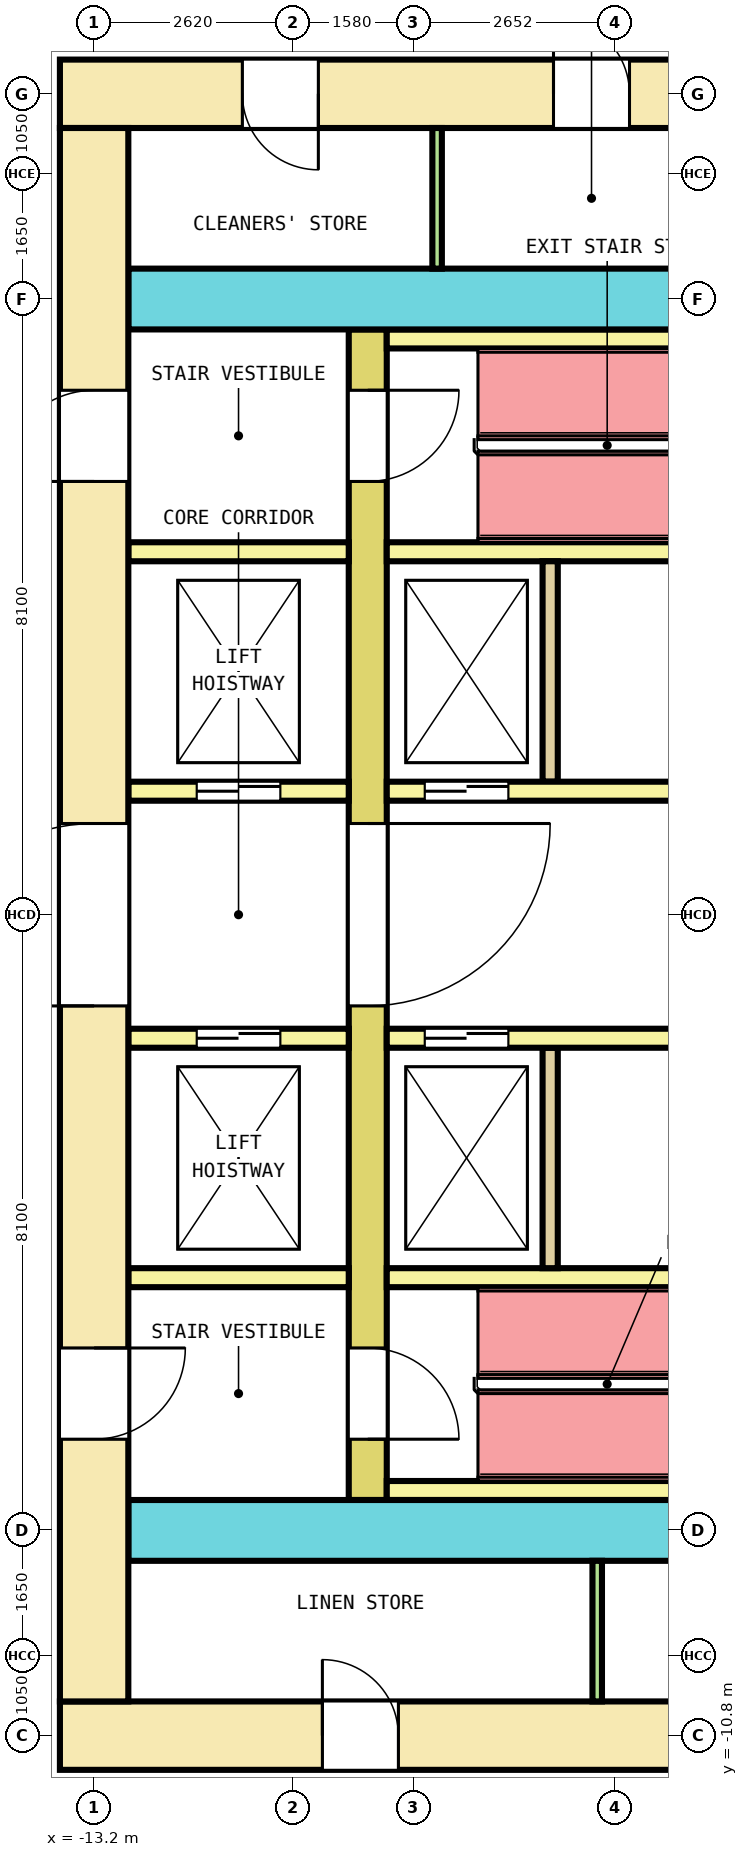
"""IFC4 building model, lengths in metres.
Left out: names, types, materials, properties, quantities, classifications, styles, units other than length and angle.
Written with IfcOpenShell. Run it as: python <this file> out.ifc"""

import sys

from ifc_helpers import new_model, si_unit, direction, frame, frame_2d, origin, place, context, subcontext, project, spatial, rectangle, extrude, element, fill, save


model = new_model("IFC4")
c1 = context("Model", 3, precision=1e-05, world=origin(), true_north=direction((0.0, 1.0)))
c2 = subcontext(c1, "Body", "Model", "MODEL_VIEW")
j1 = project(units=[si_unit("LENGTHUNIT", "METRE"), si_unit("PLANEANGLEUNIT", "RADIAN")], contexts=[c1])
p1 = place(None, origin())
s1 = spatial("IfcSite", under=j1, at=p1, CompositionType="ELEMENT")
p2 = place(p1, origin())
s2 = spatial("IfcBuilding", under=s1, at=p2, CompositionType="ELEMENT")
p3 = place(p2, frame((0.0, 0.0, 36.6)))
s3 = spatial("IfcBuildingStorey", under=s2, at=p3, CompositionType="ELEMENT", Elevation=36.6)
p4 = place(p3, frame((-13.65, 10.8, 0.0), z_axis=(0.0, 0.0, 1.0), x_axis=(1.0, 0.0, 0.0)))
e1 = element("IfcWall", 1, at=p4, inside=s3, PredefinedType="SHEAR", context=c2, shape_type="SweptSolid", body=[
    extrude(rectangle(XDim=27.3, YDim=0.9, at=frame_2d((13.65, 0.0))), origin(), (0.0, 0.0, 1.0), 4.1),
])
p5 = place(p4, frame((2.4, 0.0, 0.0)))
e2 = element("IfcOpeningElement", 2, at=p5, cuts=e1, PredefinedType="OPENING", context=c2, shape_type="SweptSolid", body=[
    extrude(rectangle(XDim=1.0, YDim=2.1, at=frame_2d((0.5, 1.05))), frame((0.0, 0.46, 0.0), z_axis=(0.0, -1.0, 0.0), x_axis=(1.0, 0.0, 0.0)), (0.0, 0.0, 1.0), 0.92),
])
p6 = place(p4, frame((6.494, 0.0, 0.0)))
e3 = element("IfcOpeningElement", 3, at=p6, cuts=e1, PredefinedType="OPENING", context=c2, shape_type="SweptSolid", body=[
    extrude(rectangle(XDim=1.0, YDim=2.1, at=frame_2d((0.5, 1.05))), frame((0.0, 0.46, 0.0), z_axis=(0.0, -1.0, 0.0), x_axis=(1.0, 0.0, 0.0)), (0.0, 0.0, 1.0), 0.92),
])
p7 = place(p4, frame((10.556, 0.0, 0.0)))
e4 = element("IfcOpeningElement", 4, at=p7, cuts=e1, PredefinedType="OPENING", context=c2, shape_type="SweptSolid", body=[
    extrude(rectangle(XDim=1.0, YDim=2.1, at=frame_2d((0.5, 1.05))), frame((0.0, 0.46, 0.0), z_axis=(0.0, -1.0, 0.0), x_axis=(1.0, 0.0, 0.0)), (0.0, 0.0, 1.0), 0.92),
])
p8 = place(p4, frame((18.859, 0.0, 0.0)))
e5 = element("IfcOpeningElement", 5, at=p8, cuts=e1, PredefinedType="OPENING", context=c2, shape_type="SweptSolid", body=[
    extrude(rectangle(XDim=1.0, YDim=2.1, at=frame_2d((0.5, 1.05))), frame((0.0, 0.46, 0.0), z_axis=(0.0, -1.0, 0.0), x_axis=(1.0, 0.0, 0.0)), (0.0, 0.0, 1.0), 0.92),
])
p9 = place(p4, frame((23.584, 0.0, 0.0)))
e6 = element("IfcOpeningElement", 6, at=p9, cuts=e1, PredefinedType="OPENING", context=c2, shape_type="SweptSolid", body=[
    extrude(rectangle(XDim=1.0, YDim=2.1, at=frame_2d((0.5, 1.05))), frame((0.0, 0.46, 0.0), z_axis=(0.0, -1.0, 0.0), x_axis=(1.0, 0.0, 0.0)), (0.0, 0.0, 1.0), 0.92),
])
p10 = place(p4, frame((14.575, 0.0, 0.0)))
e7 = element("IfcOpeningElement", 7, at=p10, cuts=e1, PredefinedType="OPENING", context=c2, shape_type="SweptSolid", body=[
    extrude(rectangle(XDim=1.4, YDim=2.1, at=frame_2d((0.7, 1.05))), frame((0.0, 0.46, 0.0), z_axis=(0.0, -1.0, 0.0), x_axis=(1.0, 0.0, 0.0)), (0.0, 0.0, 1.0), 0.92),
])
p11 = place(p3, frame((-13.65, -10.8, 0.0), z_axis=(0.0, 0.0, 1.0), x_axis=(1.0, 0.0, 0.0)))
e8 = element("IfcWall", 8, at=p11, inside=s3, PredefinedType="SHEAR", context=c2, shape_type="SweptSolid", body=[
    extrude(rectangle(XDim=27.3, YDim=0.9, at=frame_2d((13.65, 0.0))), origin(), (0.0, 0.0, 1.0), 4.1),
])
p12 = place(p11, frame((3.453, 0.0, 0.0)))
e9 = element("IfcOpeningElement", 9, at=p12, cuts=e8, PredefinedType="OPENING", context=c2, shape_type="SweptSolid", body=[
    extrude(rectangle(XDim=1.0, YDim=2.1, at=frame_2d((0.5, 1.05))), frame((0.0, 0.46, 0.0), z_axis=(0.0, -1.0, 0.0), x_axis=(1.0, 0.0, 0.0)), (0.0, 0.0, 1.0), 0.92),
])
p13 = place(p11, frame((9.653, 0.0, 0.0)))
e10 = element("IfcOpeningElement", 10, at=p13, cuts=e8, PredefinedType="OPENING", context=c2, shape_type="SweptSolid", body=[
    extrude(rectangle(XDim=1.0, YDim=2.1, at=frame_2d((0.5, 1.05))), frame((0.0, 0.46, 0.0), z_axis=(0.0, -1.0, 0.0), x_axis=(1.0, 0.0, 0.0)), (0.0, 0.0, 1.0), 0.92),
])
p14 = place(p11, frame((19.872, 0.0, 0.0)))
e11 = element("IfcOpeningElement", 11, at=p14, cuts=e8, PredefinedType="OPENING", context=c2, shape_type="SweptSolid", body=[
    extrude(rectangle(XDim=1.0, YDim=2.1, at=frame_2d((0.5, 1.05))), frame((0.0, 0.46, 0.0), z_axis=(0.0, -1.0, 0.0), x_axis=(1.0, 0.0, 0.0)), (0.0, 0.0, 1.0), 0.92),
])
p15 = place(p11, frame((23.922, 0.0, 0.0)))
e12 = element("IfcOpeningElement", 12, at=p15, cuts=e8, PredefinedType="OPENING", context=c2, shape_type="SweptSolid", body=[
    extrude(rectangle(XDim=1.0, YDim=2.1, at=frame_2d((0.5, 1.05))), frame((0.0, 0.46, 0.0), z_axis=(0.0, -1.0, 0.0), x_axis=(1.0, 0.0, 0.0)), (0.0, 0.0, 1.0), 0.92),
])
p16 = place(p11, frame((15.2, 0.0, 0.0)))
e13 = element("IfcOpeningElement", 13, at=p16, cuts=e8, PredefinedType="OPENING", context=c2, shape_type="SweptSolid", body=[
    extrude(rectangle(XDim=1.2, YDim=2.1, at=frame_2d((0.6, 1.05))), frame((0.0, 0.46, 0.0), z_axis=(0.0, -1.0, 0.0), x_axis=(1.0, 0.0, 0.0)), (0.0, 0.0, 1.0), 0.92),
])
p17 = place(p3, frame((-13.2, -10.35, 0.0), z_axis=(0.0, 0.0, 1.0), x_axis=(0.0, 1.0, 0.0)))
e14 = element("IfcWall", 14, at=p17, inside=s3, PredefinedType="SHEAR", context=c2, shape_type="SweptSolid", body=[
    extrude(rectangle(XDim=20.7, YDim=0.9, at=frame_2d((10.35, 0.0))), origin(), (0.0, 0.0, 1.0), 4.1),
])
p18 = place(p17, frame((9.15, 0.0, 0.0)))
e15 = element("IfcOpeningElement", 15, at=p18, cuts=e14, PredefinedType="OPENING", context=c2, shape_type="SweptSolid", body=[
    extrude(rectangle(XDim=2.4, YDim=2.1, at=frame_2d((1.2, 1.05))), frame((0.0, 0.46, 0.0), z_axis=(0.0, -1.0, 0.0), x_axis=(1.0, 0.0, 0.0)), (0.0, 0.0, 1.0), 0.92),
])
p19 = place(p17, frame((16.05, 0.0, 0.0)))
e16 = element("IfcOpeningElement", 16, at=p19, cuts=e14, PredefinedType="OPENING", context=c2, shape_type="SweptSolid", body=[
    extrude(rectangle(XDim=1.2, YDim=2.1, at=frame_2d((0.6, 1.05))), frame((0.0, 0.46, 0.0), z_axis=(0.0, -1.0, 0.0), x_axis=(1.0, 0.0, 0.0)), (0.0, 0.0, 1.0), 0.92),
])
p20 = place(p17, frame((3.45, 0.0, 0.0)))
e17 = element("IfcOpeningElement", 17, at=p20, cuts=e14, PredefinedType="OPENING", context=c2, shape_type="SweptSolid", body=[
    extrude(rectangle(XDim=1.2, YDim=2.1, at=frame_2d((0.6, 1.05))), frame((0.0, 0.46, 0.0), z_axis=(0.0, -1.0, 0.0), x_axis=(1.0, 0.0, 0.0)), (0.0, 0.0, 1.0), 0.92),
])
p21 = place(p3, frame((-12.75, 8.1, 0.0), z_axis=(0.0, 0.0, 1.0), x_axis=(1.0, 0.0, 0.0)))
e18 = element("IfcWall", 18, at=p21, inside=s3, PredefinedType="SHEAR", context=c2, shape_type="SweptSolid", body=[
    extrude(rectangle(XDim=25.5, YDim=0.8, at=frame_2d((12.75, 0.0))), origin(), (0.0, 0.0, 1.0), 4.1),
])
p22 = place(p21, frame((13.675, 0.0, 0.0)))
e19 = element("IfcOpeningElement", 19, at=p22, cuts=e18, PredefinedType="OPENING", context=c2, shape_type="SweptSolid", body=[
    extrude(rectangle(XDim=1.4, YDim=2.1, at=frame_2d((0.7, 1.05))), frame((0.0, 0.41, 0.0), z_axis=(0.0, -1.0, 0.0), x_axis=(1.0, 0.0, 0.0)), (0.0, 0.0, 1.0), 0.82),
])
p23 = place(p3, frame((-12.75, -8.1, 0.0), z_axis=(0.0, 0.0, 1.0), x_axis=(1.0, 0.0, 0.0)))
e20 = element("IfcWall", 20, at=p23, inside=s3, PredefinedType="SHEAR", context=c2, shape_type="SweptSolid", body=[
    extrude(rectangle(XDim=25.5, YDim=0.8, at=frame_2d((12.75, 0.0))), origin(), (0.0, 0.0, 1.0), 4.1),
])
p24 = place(p23, frame((14.3, 0.0, 0.0)))
e21 = element("IfcOpeningElement", 21, at=p24, cuts=e20, PredefinedType="OPENING", context=c2, shape_type="SweptSolid", body=[
    extrude(rectangle(XDim=1.2, YDim=2.1, at=frame_2d((0.6, 1.05))), frame((0.0, 0.41, 0.0), z_axis=(0.0, -1.0, 0.0), x_axis=(1.0, 0.0, 0.0)), (0.0, 0.0, 1.0), 0.82),
])
p25 = place(p3, frame((-9.6, -7.7, 0.0), z_axis=(0.0, 0.0, 1.0), x_axis=(0.0, 1.0, 0.0)))
e22 = element("IfcWall", 22, at=p25, inside=s3, PredefinedType="SHEAR", context=c2, shape_type="SweptSolid", body=[
    extrude(rectangle(XDim=15.4, YDim=0.5, at=frame_2d((7.7, 0.0))), origin(), (0.0, 0.0, 1.0), 4.1),
])
p26 = place(p25, frame((6.5, 0.0, 0.0)))
e23 = element("IfcOpeningElement", 23, at=p26, cuts=e22, PredefinedType="OPENING", context=c2, shape_type="SweptSolid", body=[
    extrude(rectangle(XDim=2.4, YDim=2.1, at=frame_2d((1.2, 1.05))), frame((0.0, 0.26, 0.0), z_axis=(0.0, -1.0, 0.0), x_axis=(1.0, 0.0, 0.0)), (0.0, 0.0, 1.0), 0.52),
])
p27 = place(p25, frame((13.4, 0.0, 0.0)))
e24 = element("IfcOpeningElement", 24, at=p27, cuts=e22, PredefinedType="OPENING", context=c2, shape_type="SweptSolid", body=[
    extrude(rectangle(XDim=1.2, YDim=2.1, at=frame_2d((0.6, 1.05))), frame((0.0, 0.26, 0.0), z_axis=(0.0, -1.0, 0.0), x_axis=(1.0, 0.0, 0.0)), (0.0, 0.0, 1.0), 0.52),
])
p28 = place(p25, frame((0.8, 0.0, 0.0)))
e25 = element("IfcOpeningElement", 25, at=p28, cuts=e22, PredefinedType="OPENING", context=c2, shape_type="SweptSolid", body=[
    extrude(rectangle(XDim=1.2, YDim=2.1, at=frame_2d((0.6, 1.05))), frame((0.0, 0.26, 0.0), z_axis=(0.0, -1.0, 0.0), x_axis=(1.0, 0.0, 0.0)), (0.0, 0.0, 1.0), 0.52),
])
p29 = place(p3, frame((-12.75, 1.625, 0.0), z_axis=(0.0, 0.0, 1.0), x_axis=(1.0, 0.0, 0.0)))
e26 = element("IfcWall", 26, at=p29, inside=s3, PredefinedType="SOLIDWALL", context=c2, shape_type="SweptSolid", body=[
    extrude(rectangle(XDim=2.9, YDim=0.25, at=frame_2d((1.45, 0.0))), origin(), (0.0, 0.0, 1.0), 4.1),
])
p30 = place(p29, frame((0.9, 0.0, 0.0)))
e27 = element("IfcOpeningElement", 27, at=p30, cuts=e26, PredefinedType="OPENING", context=c2, shape_type="SweptSolid", body=[
    extrude(rectangle(XDim=1.1, YDim=2.1, at=frame_2d((0.55, 1.05))), frame((0.0, 0.135, 0.0), z_axis=(0.0, -1.0, 0.0), x_axis=(1.0, 0.0, 0.0)), (0.0, 0.0, 1.0), 0.27),
])
p31 = place(p3, frame((-9.35, 1.625, 0.0), z_axis=(0.0, 0.0, 1.0), x_axis=(1.0, 0.0, 0.0)))
e28 = element("IfcWall", 28, at=p31, inside=s3, PredefinedType="SOLIDWALL", context=c2, shape_type="SweptSolid", body=[
    extrude(rectangle(XDim=18.7, YDim=0.25, at=frame_2d((9.35, 0.0))), origin(), (0.0, 0.0, 1.0), 4.1),
])
p32 = place(p31, frame((0.5, 0.0, 0.0)))
e29 = element("IfcOpeningElement", 29, at=p32, cuts=e28, PredefinedType="OPENING", context=c2, shape_type="SweptSolid", body=[
    extrude(rectangle(XDim=1.1, YDim=2.1, at=frame_2d((0.55, 1.05))), frame((0.0, 0.135, 0.0), z_axis=(0.0, -1.0, 0.0), x_axis=(1.0, 0.0, 0.0)), (0.0, 0.0, 1.0), 0.27),
])
p33 = place(p31, frame((17.1, 0.0, 0.0)))
e30 = element("IfcOpeningElement", 30, at=p33, cuts=e28, PredefinedType="OPENING", context=c2, shape_type="SweptSolid", body=[
    extrude(rectangle(XDim=1.1, YDim=2.1, at=frame_2d((0.55, 1.05))), frame((0.0, 0.135, 0.0), z_axis=(0.0, -1.0, 0.0), x_axis=(1.0, 0.0, 0.0)), (0.0, 0.0, 1.0), 0.27),
])
p34 = place(p3, frame((-12.75, 4.775, 0.0), z_axis=(0.0, 0.0, 1.0), x_axis=(1.0, 0.0, 0.0)))
e31 = element("IfcWall", 31, at=p34, inside=s3, PredefinedType="SOLIDWALL", context=c2, shape_type="SweptSolid", body=[
    extrude(rectangle(XDim=2.9, YDim=0.25, at=frame_2d((1.45, 0.0))), origin(), (0.0, 0.0, 1.0), 4.1),
])
p35 = place(p3, frame((-9.35, 4.775, 0.0), z_axis=(0.0, 0.0, 1.0), x_axis=(1.0, 0.0, 0.0)))
e32 = element("IfcWall", 32, at=p35, inside=s3, PredefinedType="SOLIDWALL", context=c2, shape_type="SweptSolid", body=[
    extrude(rectangle(XDim=18.7, YDim=0.25, at=frame_2d((9.35, 0.0))), origin(), (0.0, 0.0, 1.0), 4.1),
])
p36 = place(p3, frame((-7.2, 1.75, 0.0), z_axis=(0.0, 0.0, 1.0), x_axis=(0.0, 1.0, 0.0)))
e33 = element("IfcWall", 33, at=p36, inside=s3, PredefinedType="SOLIDWALL", context=c2, shape_type="SweptSolid", body=[
    extrude(rectangle(XDim=2.9, YDim=0.2, at=frame_2d((1.45, 0.0))), origin(), (0.0, 0.0, 1.0), 4.1),
])
p37 = place(p3, frame((-12.75, -1.625, 0.0), z_axis=(0.0, 0.0, 1.0), x_axis=(1.0, 0.0, 0.0)))
e34 = element("IfcWall", 34, at=p37, inside=s3, PredefinedType="SOLIDWALL", context=c2, shape_type="SweptSolid", body=[
    extrude(rectangle(XDim=2.9, YDim=0.25, at=frame_2d((1.45, 0.0))), origin(), (0.0, 0.0, 1.0), 4.1),
])
p38 = place(p37, frame((0.9, 0.0, 0.0)))
e35 = element("IfcOpeningElement", 35, at=p38, cuts=e34, PredefinedType="OPENING", context=c2, shape_type="SweptSolid", body=[
    extrude(rectangle(XDim=1.1, YDim=2.1, at=frame_2d((0.55, 1.05))), frame((0.0, 0.135, 0.0), z_axis=(0.0, -1.0, 0.0), x_axis=(1.0, 0.0, 0.0)), (0.0, 0.0, 1.0), 0.27),
])
p39 = place(p3, frame((-9.35, -1.625, 0.0), z_axis=(0.0, 0.0, 1.0), x_axis=(1.0, 0.0, 0.0)))
e36 = element("IfcWall", 36, at=p39, inside=s3, PredefinedType="SOLIDWALL", context=c2, shape_type="SweptSolid", body=[
    extrude(rectangle(XDim=18.7, YDim=0.25, at=frame_2d((9.35, 0.0))), origin(), (0.0, 0.0, 1.0), 4.1),
])
p40 = place(p39, frame((0.5, 0.0, 0.0)))
e37 = element("IfcOpeningElement", 37, at=p40, cuts=e36, PredefinedType="OPENING", context=c2, shape_type="SweptSolid", body=[
    extrude(rectangle(XDim=1.1, YDim=2.1, at=frame_2d((0.55, 1.05))), frame((0.0, 0.135, 0.0), z_axis=(0.0, -1.0, 0.0), x_axis=(1.0, 0.0, 0.0)), (0.0, 0.0, 1.0), 0.27),
])
p41 = place(p39, frame((17.1, 0.0, 0.0)))
e38 = element("IfcOpeningElement", 38, at=p41, cuts=e36, PredefinedType="OPENING", context=c2, shape_type="SweptSolid", body=[
    extrude(rectangle(XDim=1.1, YDim=2.1, at=frame_2d((0.55, 1.05))), frame((0.0, 0.135, 0.0), z_axis=(0.0, -1.0, 0.0), x_axis=(1.0, 0.0, 0.0)), (0.0, 0.0, 1.0), 0.27),
])
p42 = place(p3, frame((-12.75, -4.775, 0.0), z_axis=(0.0, 0.0, 1.0), x_axis=(1.0, 0.0, 0.0)))
e39 = element("IfcWall", 39, at=p42, inside=s3, PredefinedType="SOLIDWALL", context=c2, shape_type="SweptSolid", body=[
    extrude(rectangle(XDim=2.9, YDim=0.25, at=frame_2d((1.45, 0.0))), origin(), (0.0, 0.0, 1.0), 4.1),
])
p43 = place(p3, frame((-9.35, -4.775, 0.0), z_axis=(0.0, 0.0, 1.0), x_axis=(1.0, 0.0, 0.0)))
e40 = element("IfcWall", 40, at=p43, inside=s3, PredefinedType="SOLIDWALL", context=c2, shape_type="SweptSolid", body=[
    extrude(rectangle(XDim=18.7, YDim=0.25, at=frame_2d((9.35, 0.0))), origin(), (0.0, 0.0, 1.0), 4.1),
])
p44 = place(p3, frame((-7.2, -4.65, 0.0), z_axis=(0.0, 0.0, 1.0), x_axis=(0.0, 1.0, 0.0)))
e41 = element("IfcWall", 41, at=p44, inside=s3, PredefinedType="SOLIDWALL", context=c2, shape_type="SweptSolid", body=[
    extrude(rectangle(XDim=2.9, YDim=0.2, at=frame_2d((1.45, 0.0))), origin(), (0.0, 0.0, 1.0), 4.1),
])
for number, where, z_axis, x_axis in (
    (42, (-9.35, 7.575, 0.0), (0.0, 0.0, 1.0), (1.0, 0.0, 0.0)),
    (43, (-9.35, -7.575, 0.0), (0.0, 0.0, 1.0), (1.0, 0.0, 0.0)),
):
    element("IfcWall", number, at=place(p3, frame(where, z_axis=z_axis, x_axis=x_axis)), inside=s3, PredefinedType="SOLIDWALL", context=c2, shape_type="SweptSolid", body=[
        extrude(rectangle(XDim=5.8, YDim=0.25, at=frame_2d((2.9, 0.0))), origin(), (0.0, 0.0, 1.0), 4.1),
    ])
for number, where, z_axis, x_axis in (
    (44, (-8.688, 8.5, 0.0), (0.0, 0.0, 1.0), (0.0, 1.0, 0.0)),
    (45, (-6.581, -10.35, 0.0), (0.0, 0.0, 1.0), (0.0, 1.0, 0.0)),
):
    element("IfcWall", number, at=place(p3, frame(where, z_axis=z_axis, x_axis=x_axis)), inside=s3, PredefinedType="PARTITIONING", context=c2, shape_type="SweptSolid", body=[
        extrude(rectangle(XDim=1.85, YDim=0.125, at=frame_2d((0.925, 0.0))), origin(), (0.0, 0.0, 1.0), 4.1),
    ])
p45 = place(p30, origin())
e46 = element("IfcDoor", 46, at=p45, inside=s3, OperationType="DOUBLE_DOOR_SLIDING", PredefinedType="DOOR", context=c2, shape_type="SweptSolid", body=[
    extrude(rectangle(XDim=1.1, YDim=2.1, at=frame_2d((0.55, 1.05))), frame((0.0, 0.075, 0.0), z_axis=(0.0, -1.0, 0.0), x_axis=(1.0, 0.0, 0.0)), (0.0, 0.0, 1.0), 0.15),
])
fill(e27, e46)
p46 = place(p32, origin())
e47 = element("IfcDoor", 47, at=p46, inside=s3, OperationType="DOUBLE_DOOR_SLIDING", PredefinedType="DOOR", context=c2, shape_type="SweptSolid", body=[
    extrude(rectangle(XDim=1.1, YDim=2.1, at=frame_2d((0.55, 1.05))), frame((0.0, 0.075, 0.0), z_axis=(0.0, -1.0, 0.0), x_axis=(1.0, 0.0, 0.0)), (0.0, 0.0, 1.0), 0.15),
])
fill(e29, e47)
p47 = place(p38, origin())
e48 = element("IfcDoor", 48, at=p47, inside=s3, OperationType="DOUBLE_DOOR_SLIDING", PredefinedType="DOOR", context=c2, shape_type="SweptSolid", body=[
    extrude(rectangle(XDim=1.1, YDim=2.1, at=frame_2d((0.55, 1.05))), frame((0.0, 0.075, 0.0), z_axis=(0.0, -1.0, 0.0), x_axis=(1.0, 0.0, 0.0)), (0.0, 0.0, 1.0), 0.15),
])
fill(e35, e48)
p48 = place(p40, origin())
e49 = element("IfcDoor", 49, at=p48, inside=s3, OperationType="DOUBLE_DOOR_SLIDING", PredefinedType="DOOR", context=c2, shape_type="SweptSolid", body=[
    extrude(rectangle(XDim=1.1, YDim=2.1, at=frame_2d((0.55, 1.05))), frame((0.0, 0.075, 0.0), z_axis=(0.0, -1.0, 0.0), x_axis=(1.0, 0.0, 0.0)), (0.0, 0.0, 1.0), 0.15),
])
fill(e37, e49)
p49 = place(p26, origin())
e50 = element("IfcDoor", 50, at=p49, inside=s3, OperationType="DOUBLE_DOOR_SINGLE_SWING", PredefinedType="DOOR", context=c2, shape_type="SweptSolid", body=[
    extrude(rectangle(XDim=2.4, YDim=2.1, at=frame_2d((1.2, 1.05))), frame((0.0, 0.2, 0.0), z_axis=(0.0, -1.0, 0.0), x_axis=(1.0, 0.0, 0.0)), (0.0, 0.0, 1.0), 0.4),
])
fill(e23, e50)
p50 = place(p18, origin())
e51 = element("IfcDoor", 51, at=p50, inside=s3, OperationType="DOUBLE_DOOR_SINGLE_SWING", PredefinedType="DOOR", context=c2, shape_type="SweptSolid", body=[
    extrude(rectangle(XDim=2.4, YDim=2.1, at=frame_2d((1.2, 1.05))), frame((0.0, 0.3, 0.0), z_axis=(0.0, -1.0, 0.0), x_axis=(1.0, 0.0, 0.0)), (0.0, 0.0, 1.0), 0.6),
])
fill(e15, e51)
p51 = place(p27, origin())
e52 = element("IfcDoor", 52, at=p51, inside=s3, OperationType="SINGLE_SWING_RIGHT", PredefinedType="DOOR", context=c2, shape_type="SweptSolid", body=[
    extrude(rectangle(XDim=1.2, YDim=2.1, at=frame_2d((0.6, 1.05))), frame((0.0, 0.2, 0.0), z_axis=(0.0, -1.0, 0.0), x_axis=(1.0, 0.0, 0.0)), (0.0, 0.0, 1.0), 0.4),
])
fill(e24, e52)
p52 = place(p19, origin())
e53 = element("IfcDoor", 53, at=p52, inside=s3, OperationType="SINGLE_SWING_LEFT", PredefinedType="DOOR", context=c2, shape_type="SweptSolid", body=[
    extrude(rectangle(XDim=1.2, YDim=2.1, at=frame_2d((0.6, 1.05))), frame((0.0, 0.3, 0.0), z_axis=(0.0, -1.0, 0.0), x_axis=(1.0, 0.0, 0.0)), (0.0, 0.0, 1.0), 0.6),
])
fill(e16, e53)
p53 = place(p28, origin())
e54 = element("IfcDoor", 54, at=p53, inside=s3, OperationType="SINGLE_SWING_RIGHT", PredefinedType="DOOR", context=c2, shape_type="SweptSolid", body=[
    extrude(rectangle(XDim=1.2, YDim=2.1, at=frame_2d((0.6, 1.05))), frame((0.0, 0.2, 0.0), z_axis=(0.0, -1.0, 0.0), x_axis=(1.0, 0.0, 0.0)), (0.0, 0.0, 1.0), 0.4),
])
fill(e25, e54)
p54 = place(p20, origin())
e55 = element("IfcDoor", 55, at=p54, inside=s3, OperationType="SINGLE_SWING_LEFT", PredefinedType="DOOR", context=c2, shape_type="SweptSolid", body=[
    extrude(rectangle(XDim=1.2, YDim=2.1, at=frame_2d((0.6, 1.05))), frame((0.0, 0.3, 0.0), z_axis=(0.0, -1.0, 0.0), x_axis=(1.0, 0.0, 0.0)), (0.0, 0.0, 1.0), 0.6),
])
fill(e17, e55)
p55 = place(p5, origin())
e56 = element("IfcDoor", 56, at=p55, inside=s3, OperationType="SINGLE_SWING_LEFT", PredefinedType="DOOR", context=c2, shape_type="SweptSolid", body=[
    extrude(rectangle(XDim=1.0, YDim=2.1, at=frame_2d((0.5, 1.05))), frame((0.0, 0.3, 0.0), z_axis=(0.0, -1.0, 0.0), x_axis=(1.0, 0.0, 0.0)), (0.0, 0.0, 1.0), 0.6),
])
fill(e2, e56)
p56 = place(p6, origin())
e57 = element("IfcDoor", 57, at=p56, inside=s3, OperationType="SINGLE_SWING_RIGHT", PredefinedType="DOOR", context=c2, shape_type="SweptSolid", body=[
    extrude(rectangle(XDim=1.0, YDim=2.1, at=frame_2d((0.5, 1.05))), frame((0.0, 0.3, 0.0), z_axis=(0.0, -1.0, 0.0), x_axis=(1.0, 0.0, 0.0)), (0.0, 0.0, 1.0), 0.6),
])
fill(e3, e57)
p57 = place(p12, origin())
e58 = element("IfcDoor", 58, at=p57, inside=s3, OperationType="SINGLE_SWING_LEFT", PredefinedType="DOOR", context=c2, shape_type="SweptSolid", body=[
    extrude(rectangle(XDim=1.0, YDim=2.1, at=frame_2d((0.5, 1.05))), frame((0.0, 0.3, 0.0), z_axis=(0.0, -1.0, 0.0), x_axis=(1.0, 0.0, 0.0)), (0.0, 0.0, 1.0), 0.6),
])
fill(e9, e58)
save(model, sys.argv[1])
